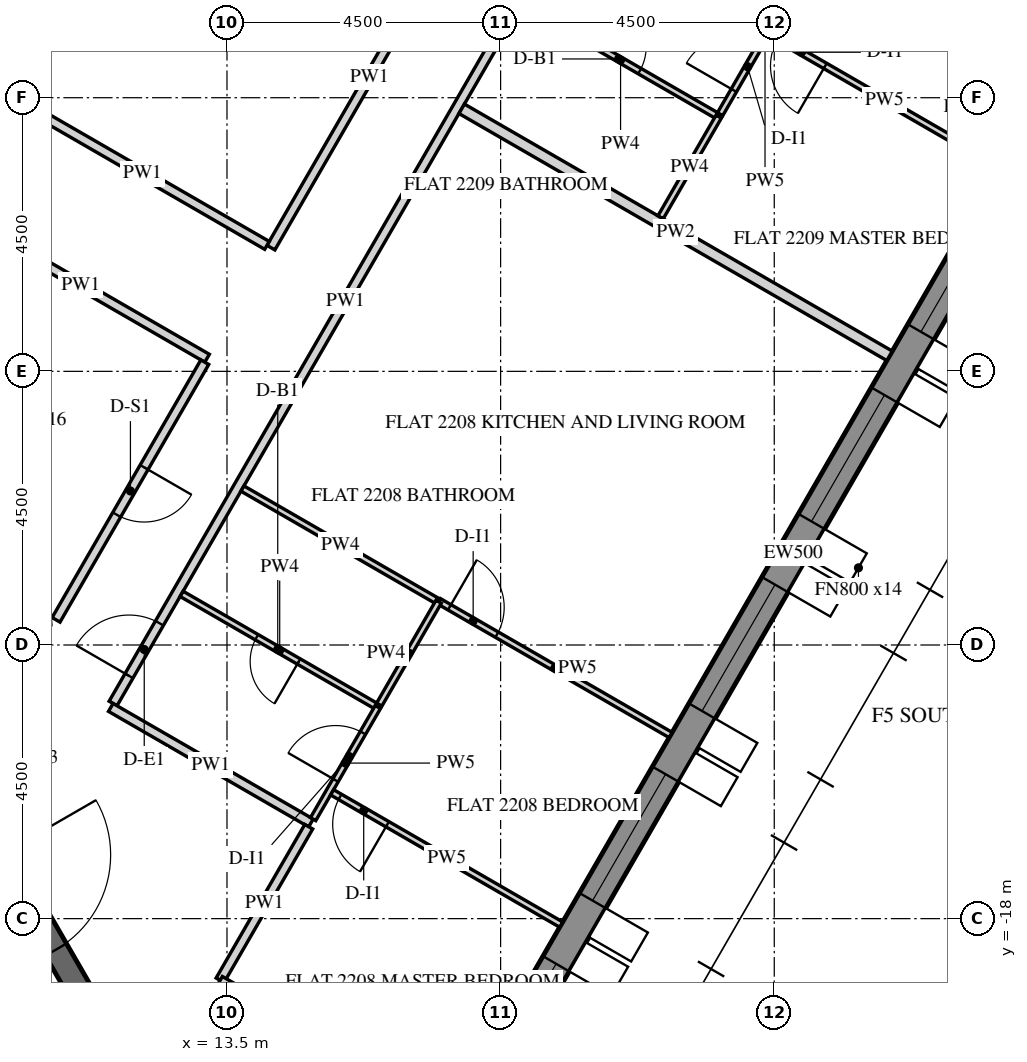
"""IFC4 building model, lengths in metres.
Left out: names, types, materials, properties, quantities, classifications, styles, units other than length and angle.
Written with IfcOpenShell. Run it as: python <this file> out.ifc"""

import sys

from ifc_helpers import new_model, si_unit, direction, frame, frame_2d, origin, place, context, subcontext, project, spatial, polyline, rectangle, outline, extrude, element, fill, save


model = new_model("IFC4")
c1 = context("Model", 3, precision=1e-05, world=origin(), true_north=direction((0.0, 1.0)))
c2 = subcontext(c1, "Body", "Model", "MODEL_VIEW")
j1 = project(units=[si_unit("LENGTHUNIT", "METRE"), si_unit("PLANEANGLEUNIT", "RADIAN")], contexts=[c1])
p1 = place(None, origin())
s1 = spatial("IfcSite", under=j1, at=p1, CompositionType="ELEMENT")
p2 = place(p1, origin())
s2 = spatial("IfcBuilding", under=s1, at=p2, CompositionType="ELEMENT")
p3 = place(p2, frame((0.0, 0.0, 279.6)))
s3 = spatial("IfcBuildingStorey", under=s2, at=p3, CompositionType="ELEMENT", Elevation=279.6)
p4 = place(p3, frame((16.451, -23.005, -0.15), z_axis=(0.0, 0.0, 1.0), x_axis=(0.500003737743, 0.866023245787, 0.0)))
e1 = element("IfcWall", 1, at=p4, inside=s3, PredefinedType="SOLIDWALL", context=c2, shape_type="SweptSolid", body=[
    extrude(outline(polyline([(-0.021, -0.25), (25.468, -0.25), (25.421, 0.25), (0.021, 0.25), (-0.021, -0.25)])), origin(), (0.0, 0.0, 1.0), 3.9),
])
p5 = place(p4, frame((2.522, 0.0, 0.75)))
e2 = element("IfcOpeningElement", 2, at=p5, cuts=e1, PredefinedType="OPENING", context=c2, shape_type="SweptSolid", body=[
    extrude(rectangle(XDim=2.4, YDim=2.7, at=frame_2d((1.2, 1.35))), frame((0.0, 0.26, 0.0), z_axis=(0.0, -1.0, 0.0), x_axis=(1.0, 0.0, 0.0)), (0.0, 0.0, 1.0), 0.52),
])
p6 = place(p4, frame((6.122, 0.0, 0.75)))
e3 = element("IfcOpeningElement", 3, at=p6, cuts=e1, PredefinedType="OPENING", context=c2, shape_type="SweptSolid", body=[
    extrude(rectangle(XDim=2.4, YDim=2.7, at=frame_2d((1.2, 1.35))), frame((0.0, 0.26, 0.0), z_axis=(0.0, -1.0, 0.0), x_axis=(1.0, 0.0, 0.0)), (0.0, 0.0, 1.0), 0.52),
])
p7 = place(p4, frame((9.722, 0.0, 0.75)))
e4 = element("IfcOpeningElement", 4, at=p7, cuts=e1, PredefinedType="OPENING", context=c2, shape_type="SweptSolid", body=[
    extrude(rectangle(XDim=2.4, YDim=2.7, at=frame_2d((1.2, 1.35))), frame((0.0, 0.26, 0.0), z_axis=(0.0, -1.0, 0.0), x_axis=(1.0, 0.0, 0.0)), (0.0, 0.0, 1.0), 0.52),
])
p8 = place(p4, frame((13.323, 0.0, 0.75)))
e5 = element("IfcOpeningElement", 5, at=p8, cuts=e1, PredefinedType="OPENING", context=c2, shape_type="SweptSolid", body=[
    extrude(rectangle(XDim=2.4, YDim=2.7, at=frame_2d((1.2, 1.35))), frame((0.0, 0.26, 0.0), z_axis=(0.0, -1.0, 0.0), x_axis=(1.0, 0.0, 0.0)), (0.0, 0.0, 1.0), 0.52),
])
p9 = place(p4, frame((16.922, 0.0, 0.75)))
e6 = element("IfcOpeningElement", 6, at=p9, cuts=e1, PredefinedType="OPENING", context=c2, shape_type="SweptSolid", body=[
    extrude(rectangle(XDim=2.4, YDim=2.7, at=frame_2d((1.2, 1.35))), frame((0.0, 0.26, 0.0), z_axis=(0.0, -1.0, 0.0), x_axis=(1.0, 0.0, 0.0)), (0.0, 0.0, 1.0), 0.52),
])
p10 = place(p4, frame((20.522, 0.0, 0.75)))
e7 = element("IfcOpeningElement", 7, at=p10, cuts=e1, PredefinedType="OPENING", context=c2, shape_type="SweptSolid", body=[
    extrude(rectangle(XDim=2.4, YDim=2.7, at=frame_2d((1.2, 1.35))), frame((0.0, 0.26, 0.0), z_axis=(0.0, -1.0, 0.0), x_axis=(1.0, 0.0, 0.0)), (0.0, 0.0, 1.0), 0.52),
])
p11 = place(p3, frame((6.235, -10.8, -0.15), z_axis=(0.0, 0.0, 1.0), x_axis=(0.499996419489, 0.866027470984, 0.0)))
e8 = element("IfcWall", 8, at=p11, inside=s3, PredefinedType="SHEAR", context=c2, shape_type="SweptSolid", body=[
    extrude(outline(polyline([(-0.115, -0.2), (12.586, -0.2), (12.355, 0.2), (0.115, 0.2), (-0.115, -0.2)])), origin(), (0.0, 0.0, 1.0), 3.9),
])
p12 = place(p11, frame((5.364, 0.0, 0.15)))
e9 = element("IfcOpeningElement", 9, at=p12, cuts=e8, PredefinedType="OPENING", context=c2, shape_type="SweptSolid", body=[
    extrude(rectangle(XDim=1.8, YDim=2.4, at=frame_2d((0.9, 1.2))), frame((0.0, 0.21, 0.0), z_axis=(0.0, -1.0, 0.0), x_axis=(1.0, 0.0, 0.0)), (0.0, 0.0, 1.0), 0.42),
])
p13 = place(p3, frame((6.351, -11.0, -0.15), z_axis=(0.0, 0.0, 1.0), x_axis=(0.499998894578, -0.866026041999, 0.0)))
e10 = element("IfcWall", 10, at=p13, inside=s3, PredefinedType="SHEAR", context=c2, shape_type="SweptSolid", body=[
    extrude(rectangle(XDim=15.544, YDim=0.4, at=frame_2d((7.772, 0.0))), origin(), (0.0, 0.0, 1.0), 3.9),
])
p14 = place(p13, frame((6.872, 0.0, 0.15)))
e11 = element("IfcOpeningElement", 11, at=p14, cuts=e10, PredefinedType="OPENING", context=c2, shape_type="SweptSolid", body=[
    extrude(rectangle(XDim=1.8, YDim=2.4, at=frame_2d((0.9, 1.2))), frame((0.0, 0.21, 0.0), z_axis=(0.0, -1.0, 0.0), x_axis=(1.0, 0.0, 0.0)), (0.0, 0.0, 1.0), 0.42),
])
p15 = place(p3, frame((11.627, -14.462, 0.0), z_axis=(0.0, 0.0, 1.0), x_axis=(0.499994634027, 0.866028501808, 0.0)))
e12 = element("IfcWall", 12, at=p15, inside=s3, PredefinedType="PARTITIONING", context=c2, shape_type="SweptSolid", body=[
    extrude(rectangle(XDim=15.296, YDim=0.15, at=frame_2d((7.648, 0.0))), origin(), (0.0, 0.0, 1.0), 2.988),
])
p16 = place(p15, frame((0.525, 0.0, 0.0)))
e13 = element("IfcOpeningElement", 13, at=p16, cuts=e12, PredefinedType="OPENING", context=c2, shape_type="SweptSolid", body=[
    extrude(rectangle(XDim=1.0, YDim=2.1, at=frame_2d((0.5, 1.05))), frame((0.0, 0.085, 0.0), z_axis=(0.0, -1.0, 0.0), x_axis=(1.0, 0.0, 0.0)), (0.0, 0.0, 1.0), 0.17),
])
p17 = place(p15, frame((14.146, 0.0, 0.0)))
e14 = element("IfcOpeningElement", 14, at=p17, cuts=e12, PredefinedType="OPENING", context=c2, shape_type="SweptSolid", body=[
    extrude(rectangle(XDim=1.0, YDim=2.1, at=frame_2d((0.5, 1.05))), frame((0.0, 0.085, 0.0), z_axis=(0.0, -1.0, 0.0), x_axis=(1.0, 0.0, 0.0)), (0.0, 0.0, 1.0), 0.17),
])
p18 = place(p3, frame((14.88, -16.427, 0.0), z_axis=(0.0, 0.0, 1.0), x_axis=(-0.86601654697, 0.500015340139, 0.0)))
e15 = element("IfcWall", 15, at=p18, inside=s3, PredefinedType="PARTITIONING", context=c2, shape_type="SweptSolid", body=[
    extrude(rectangle(XDim=3.8, YDim=0.15, at=frame_2d((1.9, 0.0))), origin(), (0.0, 0.0, 1.0), 2.988),
])
p19 = place(p3, frame((13.386, -19.014, 0.0), z_axis=(0.0, 0.0, 1.0), x_axis=(0.499983307531, 0.866035040971, 0.0)))
e16 = element("IfcWall", 16, at=p19, inside=s3, PredefinedType="PARTITIONING", context=c2, shape_type="SweptSolid", body=[
    extrude(rectangle(XDim=2.917, YDim=0.15, at=frame_2d((1.458, 0.0))), origin(), (0.0, 0.0, 1.0), 2.988),
])
p20 = place(p3, frame((17.196, -21.216, 0.0), z_axis=(0.0, 0.0, 1.0), x_axis=(-0.866010893236, 0.500025132165, 0.0)))
e17 = element("IfcWall", 17, at=p20, inside=s3, PredefinedType="PARTITIONING", context=c2, shape_type="SweptSolid", body=[
    extrude(rectangle(XDim=4.399, YDim=0.15, at=frame_2d((2.199, 0.0))), origin(), (0.0, 0.0, 1.0), 2.988),
])
p21 = place(p3, frame((17.465, -1.349, 0.0), z_axis=(0.0, 0.0, 1.0), x_axis=(-0.500001610943, -0.866024473704, 0.0)))
e18 = element("IfcWall", 18, at=p21, inside=s3, PredefinedType="PARTITIONING", context=c2, shape_type="SweptSolid", body=[
    extrude(rectangle(XDim=6.485, YDim=0.15, at=frame_2d((3.243, 0.0))), origin(), (0.0, 0.0, 1.0), 2.988),
])
p22 = place(p3, frame((14.158, -6.928, 0.0), z_axis=(0.0, 0.0, 1.0), x_axis=(-0.866024684746, 0.500001245408, 0.0)))
e19 = element("IfcWall", 19, at=p22, inside=s3, PredefinedType="PARTITIONING", context=c2, shape_type="SweptSolid", body=[
    extrude(rectangle(XDim=4.725, YDim=0.15, at=frame_2d((2.363, 0.0))), origin(), (0.0, 0.0, 1.0), 2.988),
])
p23 = place(p3, frame((9.016, -6.384, 0.0), z_axis=(0.0, 0.0, 1.0), x_axis=(0.866015339567, -0.500017431331, 0.0)))
e20 = element("IfcWall", 20, at=p23, inside=s3, PredefinedType="PARTITIONING", context=c2, shape_type="SweptSolid", body=[
    extrude(rectangle(XDim=4.8, YDim=0.15, at=frame_2d((2.4, 0.0))), origin(), (0.0, 0.0, 1.0), 2.988),
])
p24 = place(p3, frame((13.135, -8.849, 0.0), z_axis=(0.0, 0.0, 1.0), x_axis=(-0.500024829938, -0.866011067739, 0.0)))
e21 = element("IfcWall", 21, at=p24, inside=s3, PredefinedType="PARTITIONING", context=c2, shape_type="SweptSolid", body=[
    extrude(rectangle(XDim=4.892, YDim=0.15, at=frame_2d((2.446, 0.0))), origin(), (0.0, 0.0, 1.0), 2.988),
])
p25 = place(p24, frame((1.996, 0.0, 0.0)))
e22 = element("IfcOpeningElement", 22, at=p25, cuts=e21, PredefinedType="OPENING", context=c2, shape_type="SweptSolid", body=[
    extrude(rectangle(XDim=0.9, YDim=2.1, at=frame_2d((0.45, 1.05))), frame((0.0, 0.085, 0.0), z_axis=(0.0, -1.0, 0.0), x_axis=(1.0, 0.0, 0.0)), (0.0, 0.0, 1.0), 0.17),
])
p26 = place(p3, frame((13.754, -10.927, 0.0), z_axis=(0.0, 0.0, 1.0), x_axis=(0.866040420308, -0.499973989716, 0.0)))
e23 = element("IfcWall", 23, at=p26, inside=s3, PredefinedType="PARTITIONING", context=c2, shape_type="SweptSolid", body=[
    extrude(rectangle(XDim=3.725, YDim=0.1, at=frame_2d((1.862, 0.0))), origin(), (0.0, 0.0, 1.0), 2.988),
])
p27 = place(p3, frame((16.986, -12.78, 0.0), z_axis=(0.0, 0.0, 1.0), x_axis=(0.866032203192, -0.499988222896, 0.0)))
e24 = element("IfcWall", 24, at=p27, inside=s3, PredefinedType="PARTITIONING", context=c2, shape_type="SweptSolid", body=[
    extrude(rectangle(XDim=4.4, YDim=0.1, at=frame_2d((2.2, 0.0))), origin(), (0.0, 0.0, 1.0), 2.988),
])
p28 = place(p27, frame((0.2, 0.0, 0.0)))
e25 = element("IfcOpeningElement", 25, at=p28, cuts=e24, PredefinedType="OPENING", context=c2, shape_type="SweptSolid", body=[
    extrude(rectangle(XDim=0.9, YDim=2.1, at=frame_2d((0.45, 1.05))), frame((0.0, 0.06, 0.0), z_axis=(0.0, -1.0, 0.0), x_axis=(1.0, 0.0, 0.0)), (0.0, 0.0, 1.0), 0.12),
])
p29 = place(p3, frame((24.396, -8.745, 0.0), z_axis=(0.0, 0.0, 1.0), x_axis=(-0.866022959057, 0.500004234368, 0.0)))
e26 = element("IfcWall", 26, at=p29, inside=s3, PredefinedType="PARTITIONING", context=c2, shape_type="SweptSolid", body=[
    extrude(rectangle(XDim=8.125, YDim=0.18, at=frame_2d((4.062, 0.0))), origin(), (0.0, 0.0, 1.0), 2.988),
])
p30 = place(p3, frame((15.98, -14.522, 0.0), z_axis=(0.0, 0.0, 1.0), x_axis=(-0.866012039196, 0.500023147432, 0.0)))
e27 = element("IfcWall", 27, at=p30, inside=s3, PredefinedType="PARTITIONING", context=c2, shape_type="SweptSolid", body=[
    extrude(rectangle(XDim=3.725, YDim=0.1, at=frame_2d((1.862, 0.0))), origin(), (0.0, 0.0, 1.0), 2.988),
])
p31 = place(p30, frame((1.5, 0.0, 0.0)))
e28 = element("IfcOpeningElement", 28, at=p31, cuts=e27, PredefinedType="OPENING", context=c2, shape_type="SweptSolid", body=[
    extrude(rectangle(XDim=0.8, YDim=2.1, at=frame_2d((0.4, 1.05))), frame((0.0, 0.06, 0.0), z_axis=(0.0, -1.0, 0.0), x_axis=(1.0, 0.0, 0.0)), (0.0, 0.0, 1.0), 0.12),
])
p32 = place(p3, frame((14.917, -16.364, 0.0), z_axis=(0.0, 0.0, 1.0), x_axis=(0.499987164874, 0.866032814021, 0.0)))
e29 = element("IfcWall", 29, at=p32, inside=s3, PredefinedType="PARTITIONING", context=c2, shape_type="SweptSolid", body=[
    extrude(rectangle(XDim=2.129, YDim=0.1, at=frame_2d((1.064, 0.0))), origin(), (0.0, 0.0, 1.0), 2.988),
])
p33 = place(p32, frame((0.738, 0.0, 0.0)))
e30 = element("IfcOpeningElement", 30, at=p33, cuts=e29, PredefinedType="OPENING", context=c2, shape_type="SweptSolid", body=[
    extrude(rectangle(XDim=0.9, YDim=2.1, at=frame_2d((0.45, 1.05))), frame((0.0, 0.06, 0.0), z_axis=(0.0, -1.0, 0.0), x_axis=(1.0, 0.0, 0.0)), (0.0, 0.0, 1.0), 0.12),
])
p34 = place(p3, frame((16.004, -14.48, 0.0), z_axis=(0.0, 0.0, 1.0), x_axis=(0.499888292545, 0.866089888508, 0.0)))
e31 = element("IfcWall", 31, at=p34, inside=s3, PredefinedType="PARTITIONING", context=c2, shape_type="SweptSolid", body=[
    extrude(rectangle(XDim=1.954, YDim=0.1, at=frame_2d((0.977, 0.0))), origin(), (0.0, 0.0, 1.0), 2.988),
])
p35 = place(p3, frame((18.996, -18.098, 0.0), z_axis=(0.0, 0.0, 1.0), x_axis=(-0.866027639635, 0.499996127374, 0.0)))
e32 = element("IfcWall", 32, at=p35, inside=s3, PredefinedType="PARTITIONING", context=c2, shape_type="SweptSolid", body=[
    extrude(rectangle(XDim=4.35, YDim=0.1, at=frame_2d((2.175, 0.0))), origin(), (0.0, 0.0, 1.0), 2.988),
])
p36 = place(p35, frame((3.3, 0.0, 0.0)))
e33 = element("IfcOpeningElement", 33, at=p36, cuts=e32, PredefinedType="OPENING", context=c2, shape_type="SweptSolid", body=[
    extrude(rectangle(XDim=0.9, YDim=2.1, at=frame_2d((0.45, 1.05))), frame((0.0, 0.06, 0.0), z_axis=(0.0, -1.0, 0.0), x_axis=(1.0, 0.0, 0.0)), (0.0, 0.0, 1.0), 0.12),
])
p37 = place(p3, frame((18.36, -2.95, 0.0), z_axis=(0.0, 0.0, 1.0), x_axis=(0.866012039196, -0.500023147432, 0.0)))
e34 = element("IfcWall", 34, at=p37, inside=s3, PredefinedType="PARTITIONING", context=c2, shape_type="SweptSolid", body=[
    extrude(rectangle(XDim=3.725, YDim=0.1, at=frame_2d((1.862, 0.0))), origin(), (0.0, 0.0, 1.0), 2.988),
])
p38 = place(p37, frame((1.425, 0.0, 0.0)))
e35 = element("IfcOpeningElement", 35, at=p38, cuts=e34, PredefinedType="OPENING", context=c2, shape_type="SweptSolid", body=[
    extrude(rectangle(XDim=0.8, YDim=2.1, at=frame_2d((0.4, 1.05))), frame((0.0, 0.06, 0.0), z_axis=(0.0, -1.0, 0.0), x_axis=(1.0, 0.0, 0.0)), (0.0, 0.0, 1.0), 0.12),
])
p39 = place(p3, frame((21.61, -4.771, 0.0), z_axis=(0.0, 0.0, 1.0), x_axis=(0.499934698534, 0.866063102321, 0.0)))
e36 = element("IfcWall", 36, at=p39, inside=s3, PredefinedType="PARTITIONING", context=c2, shape_type="SweptSolid", body=[
    extrude(rectangle(XDim=2.954, YDim=0.1, at=frame_2d((1.477, 0.0))), origin(), (0.0, 0.0, 1.0), 2.988),
])
p40 = place(p39, frame((0.452, 0.0, 0.0)))
e37 = element("IfcOpeningElement", 37, at=p40, cuts=e36, PredefinedType="OPENING", context=c2, shape_type="SweptSolid", body=[
    extrude(rectangle(XDim=0.9, YDim=2.1, at=frame_2d((0.45, 1.05))), frame((0.0, 0.06, 0.0), z_axis=(0.0, -1.0, 0.0), x_axis=(1.0, 0.0, 0.0)), (0.0, 0.0, 1.0), 0.12),
])
p41 = place(p39, frame((1.802, 0.0, 0.0)))
e38 = element("IfcOpeningElement", 38, at=p41, cuts=e36, PredefinedType="OPENING", context=c2, shape_type="SweptSolid", body=[
    extrude(rectangle(XDim=0.9, YDim=2.1, at=frame_2d((0.45, 1.05))), frame((0.0, 0.06, 0.0), z_axis=(0.0, -1.0, 0.0), x_axis=(1.0, 0.0, 0.0)), (0.0, 0.0, 1.0), 0.12),
])
p42 = place(p3, frame((20.631, -6.467, 0.0), z_axis=(0.0, 0.0, 1.0), x_axis=(0.49994353734, 0.866058000062, 0.0)))
e39 = element("IfcWall", 39, at=p42, inside=s3, PredefinedType="PARTITIONING", context=c2, shape_type="SweptSolid", body=[
    extrude(rectangle(XDim=1.912, YDim=0.1, at=frame_2d((0.956, 0.0))), origin(), (0.0, 0.0, 1.0), 2.988),
])
p43 = place(p3, frame((26.196, -5.627, 0.0), z_axis=(0.0, 0.0, 1.0), x_axis=(-0.866013608182, 0.500020430026, 0.0)))
e40 = element("IfcWall", 40, at=p43, inside=s3, PredefinedType="PARTITIONING", context=c2, shape_type="SweptSolid", body=[
    extrude(rectangle(XDim=4.35, YDim=0.1, at=frame_2d((2.175, 0.0))), origin(), (0.0, 0.0, 1.0), 2.988),
])
p44 = place(p43, frame((3.3, 0.0, 0.0)))
e41 = element("IfcOpeningElement", 41, at=p44, cuts=e40, PredefinedType="OPENING", context=c2, shape_type="SweptSolid", body=[
    extrude(rectangle(XDim=0.9, YDim=2.1, at=frame_2d((0.45, 1.05))), frame((0.0, 0.06, 0.0), z_axis=(0.0, -1.0, 0.0), x_axis=(1.0, 0.0, 0.0)), (0.0, 0.0, 1.0), 0.12),
])
p45 = place(p5, frame((0.0, 0.18, 0.0)))
e42 = element("IfcWindow", 42, at=p45, inside=s3, PartitioningType="DOUBLE_PANEL_VERTICAL", PredefinedType="WINDOW", context=c2, shape_type="SweptSolid", body=[
    extrude(rectangle(XDim=2.4, YDim=2.7, at=frame_2d((1.2, 1.35))), frame((0.0, 0.03, 0.0), z_axis=(0.0, -1.0, 0.0), x_axis=(1.0, 0.0, 0.0)), (0.0, 0.0, 1.0), 0.06),
])
fill(e2, e42)
p46 = place(p6, frame((0.0, 0.18, 0.0)))
e43 = element("IfcWindow", 43, at=p46, inside=s3, PartitioningType="DOUBLE_PANEL_VERTICAL", PredefinedType="WINDOW", context=c2, shape_type="SweptSolid", body=[
    extrude(rectangle(XDim=2.4, YDim=2.7, at=frame_2d((1.2, 1.35))), frame((0.0, 0.03, 0.0), z_axis=(0.0, -1.0, 0.0), x_axis=(1.0, 0.0, 0.0)), (0.0, 0.0, 1.0), 0.06),
])
fill(e3, e43)
p47 = place(p7, frame((0.0, 0.18, 0.0)))
e44 = element("IfcWindow", 44, at=p47, inside=s3, PartitioningType="DOUBLE_PANEL_VERTICAL", PredefinedType="WINDOW", context=c2, shape_type="SweptSolid", body=[
    extrude(rectangle(XDim=2.4, YDim=2.7, at=frame_2d((1.2, 1.35))), frame((0.0, 0.03, 0.0), z_axis=(0.0, -1.0, 0.0), x_axis=(1.0, 0.0, 0.0)), (0.0, 0.0, 1.0), 0.06),
])
fill(e4, e44)
p48 = place(p8, frame((0.0, 0.18, 0.0)))
e45 = element("IfcWindow", 45, at=p48, inside=s3, PartitioningType="DOUBLE_PANEL_VERTICAL", PredefinedType="WINDOW", context=c2, shape_type="SweptSolid", body=[
    extrude(rectangle(XDim=2.4, YDim=2.7, at=frame_2d((1.2, 1.35))), frame((0.0, 0.03, 0.0), z_axis=(0.0, -1.0, 0.0), x_axis=(1.0, 0.0, 0.0)), (0.0, 0.0, 1.0), 0.06),
])
fill(e5, e45)
p49 = place(p9, frame((0.0, 0.18, 0.0)))
e46 = element("IfcWindow", 46, at=p49, inside=s3, PartitioningType="DOUBLE_PANEL_VERTICAL", PredefinedType="WINDOW", context=c2, shape_type="SweptSolid", body=[
    extrude(rectangle(XDim=2.4, YDim=2.7, at=frame_2d((1.2, 1.35))), frame((0.0, 0.03, 0.0), z_axis=(0.0, -1.0, 0.0), x_axis=(1.0, 0.0, 0.0)), (0.0, 0.0, 1.0), 0.06),
])
fill(e6, e46)
p50 = place(p14, origin())
e47 = element("IfcDoor", 47, at=p50, inside=s3, OperationType="DOUBLE_DOOR_SINGLE_SWING", PredefinedType="DOOR", context=c2, shape_type="SweptSolid", body=[
    extrude(rectangle(XDim=1.8, YDim=2.4, at=frame_2d((0.9, 1.2))), frame((0.0, 0.025, 0.0), z_axis=(0.0, -1.0, 0.0), x_axis=(1.0, 0.0, 0.0)), (0.0, 0.0, 1.0), 0.05),
])
fill(e11, e47)
p51 = place(p16, origin())
e48 = element("IfcDoor", 48, at=p51, inside=s3, OperationType="SINGLE_SWING_RIGHT", PredefinedType="DOOR", context=c2, shape_type="SweptSolid", body=[
    extrude(rectangle(XDim=1.0, YDim=2.1, at=frame_2d((0.5, 1.05))), frame((0.0, 0.025, 0.0), z_axis=(0.0, -1.0, 0.0), x_axis=(1.0, 0.0, 0.0)), (0.0, 0.0, 1.0), 0.05),
])
fill(e13, e48)
p52 = place(p31, origin())
e49 = element("IfcDoor", 49, at=p52, inside=s3, OperationType="SINGLE_SWING_LEFT", PredefinedType="DOOR", context=c2, shape_type="SweptSolid", body=[
    extrude(rectangle(XDim=0.8, YDim=2.1, at=frame_2d((0.4, 1.05))), frame((0.0, 0.025, 0.0), z_axis=(0.0, -1.0, 0.0), x_axis=(1.0, 0.0, 0.0)), (0.0, 0.0, 1.0), 0.05),
])
fill(e28, e49)
p53 = place(p33, origin())
e50 = element("IfcDoor", 50, at=p53, inside=s3, OperationType="SINGLE_SWING_RIGHT", PredefinedType="DOOR", context=c2, shape_type="SweptSolid", body=[
    extrude(rectangle(XDim=0.9, YDim=2.1, at=frame_2d((0.45, 1.05))), frame((0.0, 0.025, 0.0), z_axis=(0.0, -1.0, 0.0), x_axis=(1.0, 0.0, 0.0)), (0.0, 0.0, 1.0), 0.05),
])
fill(e30, e50)
p54 = place(p36, origin())
e51 = element("IfcDoor", 51, at=p54, inside=s3, OperationType="SINGLE_SWING_RIGHT", PredefinedType="DOOR", context=c2, shape_type="SweptSolid", body=[
    extrude(rectangle(XDim=0.9, YDim=2.1, at=frame_2d((0.45, 1.05))), frame((0.0, 0.025, 0.0), z_axis=(0.0, -1.0, 0.0), x_axis=(1.0, 0.0, 0.0)), (0.0, 0.0, 1.0), 0.05),
])
fill(e33, e51)
p55 = place(p28, origin())
e52 = element("IfcDoor", 52, at=p55, inside=s3, OperationType="SINGLE_SWING_RIGHT", PredefinedType="DOOR", context=c2, shape_type="SweptSolid", body=[
    extrude(rectangle(XDim=0.9, YDim=2.1, at=frame_2d((0.45, 1.05))), frame((0.0, 0.025, 0.0), z_axis=(0.0, -1.0, 0.0), x_axis=(1.0, 0.0, 0.0)), (0.0, 0.0, 1.0), 0.05),
])
fill(e25, e52)
p56 = place(p38, origin())
e53 = element("IfcDoor", 53, at=p56, inside=s3, OperationType="SINGLE_SWING_RIGHT", PredefinedType="DOOR", context=c2, shape_type="SweptSolid", body=[
    extrude(rectangle(XDim=0.8, YDim=2.1, at=frame_2d((0.4, 1.05))), frame((0.0, 0.025, 0.0), z_axis=(0.0, -1.0, 0.0), x_axis=(1.0, 0.0, 0.0)), (0.0, 0.0, 1.0), 0.05),
])
fill(e35, e53)
p57 = place(p40, origin())
e54 = element("IfcDoor", 54, at=p57, inside=s3, OperationType="SINGLE_SWING_LEFT", PredefinedType="DOOR", context=c2, shape_type="SweptSolid", body=[
    extrude(rectangle(XDim=0.9, YDim=2.1, at=frame_2d((0.45, 1.05))), frame((0.0, 0.025, 0.0), z_axis=(0.0, -1.0, 0.0), x_axis=(1.0, 0.0, 0.0)), (0.0, 0.0, 1.0), 0.05),
])
fill(e37, e54)
p58 = place(p44, origin())
e55 = element("IfcDoor", 55, at=p58, inside=s3, OperationType="SINGLE_SWING_RIGHT", PredefinedType="DOOR", context=c2, shape_type="SweptSolid", body=[
    extrude(rectangle(XDim=0.9, YDim=2.1, at=frame_2d((0.45, 1.05))), frame((0.0, 0.025, 0.0), z_axis=(0.0, -1.0, 0.0), x_axis=(1.0, 0.0, 0.0)), (0.0, 0.0, 1.0), 0.05),
])
fill(e41, e55)
p59 = place(p25, origin())
e56 = element("IfcDoor", 56, at=p59, inside=s3, OperationType="SINGLE_SWING_LEFT", PredefinedType="DOOR", context=c2, shape_type="SweptSolid", body=[
    extrude(rectangle(XDim=0.9, YDim=2.1, at=frame_2d((0.45, 1.05))), frame((0.0, 0.025, 0.0), z_axis=(0.0, -1.0, 0.0), x_axis=(1.0, 0.0, 0.0)), (0.0, 0.0, 1.0), 0.05),
])
fill(e22, e56)
save(model, sys.argv[1])
